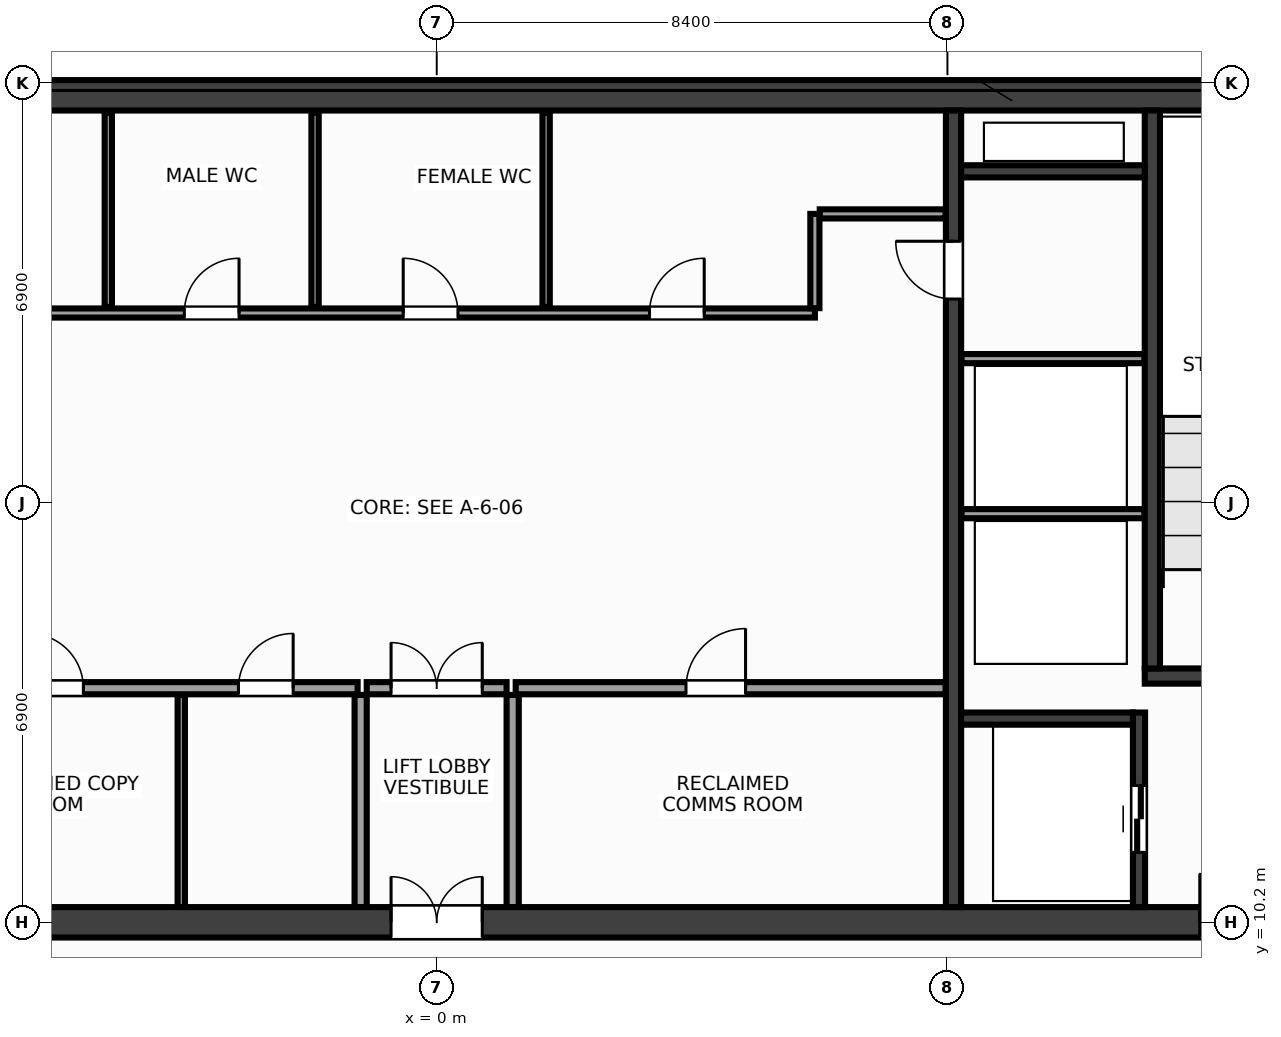
"""IFC4 building model, lengths in metres.
Left out: names, types, materials, properties, quantities, classifications, styles, units other than length and angle.
Written with IfcOpenShell. Run it as: python <this file> out.ifc"""

import sys

from ifc_helpers import new_model, si_unit, direction, frame, frame_2d, origin, place, context, subcontext, project, spatial, rectangle, extrude, source, transform, mapped, element, fill, save


model = new_model("IFC4")
c1 = context("Model", 3, precision=1e-05, world=origin(), true_north=direction((0.0, 1.0)))
c2 = subcontext(c1, "Body", "Model", "MODEL_VIEW")
j1 = project(units=[si_unit("LENGTHUNIT", "METRE"), si_unit("PLANEANGLEUNIT", "RADIAN")], contexts=[c1])
p1 = place(None, origin())
s1 = spatial("IfcSite", under=j1, at=p1, CompositionType="ELEMENT")
p2 = place(p1, origin())
s2 = spatial("IfcBuilding", under=s1, at=p2, CompositionType="ELEMENT")
p3 = place(p2, frame((0.0, 0.0, 214.4)))
s3 = spatial("IfcBuildingStorey", under=s2, at=p3, CompositionType="ELEMENT", Elevation=214.4)
m1 = source(origin(), c2, "Body", "SweptSolid", [
    extrude(rectangle(XDim=31.7, YDim=0.5, at=frame_2d((15.85, 0.0))), origin(), (0.0, 0.0, 1.0), 3.6),
])
p4 = place(p3, frame((-15.85, 23.8, 0.0), z_axis=(0.0, 0.0, 1.0), x_axis=(1.0, 0.0, 0.0)))
e1 = element("IfcWall", 1, at=p4, inside=s3, PredefinedType="SHEAR", context=c2, shape_type="MappedRepresentation", body=[
    mapped(m1, transform((0.0, 0.0, 0.0), x_axis=(1.0, 0.0, 0.0), y_axis=(0.0, 1.0, 0.0), z_axis=(0.0, 0.0, 1.0), scale=1.0)),
])
p5 = place(p3, frame((-15.85, 10.2, 0.0), z_axis=(0.0, 0.0, 1.0), x_axis=(1.0, 0.0, 0.0)))
e2 = element("IfcWall", 2, at=p5, inside=s3, PredefinedType="SHEAR", context=c2, shape_type="MappedRepresentation", body=[
    mapped(m1, transform((0.0, 0.0, 0.0), x_axis=(1.0, 0.0, 0.0), y_axis=(0.0, 1.0, 0.0), z_axis=(0.0, 0.0, 1.0), scale=1.0)),
])
p6 = place(p5, frame((1.7, 0.0, 0.0)))
e3 = element("IfcOpeningElement", 3, at=p6, cuts=e2, PredefinedType="OPENING", context=c2, shape_type="SweptSolid", body=[
    extrude(rectangle(XDim=1.6, YDim=2.15, at=frame_2d((0.8, 1.075))), frame((0.0, 0.262, 0.0), z_axis=(0.0, -1.0, 0.0), x_axis=(1.0, 0.0, 0.0)), (0.0, 0.0, 1.0), 0.524),
])
p7 = place(p5, frame((28.4, 0.0, 0.0)))
e4 = element("IfcOpeningElement", 4, at=p7, cuts=e2, PredefinedType="OPENING", context=c2, shape_type="SweptSolid", body=[
    extrude(rectangle(XDim=1.6, YDim=2.15, at=frame_2d((0.8, 1.075))), frame((0.0, 0.262, 0.0), z_axis=(0.0, -1.0, 0.0), x_axis=(1.0, 0.0, 0.0)), (0.0, 0.0, 1.0), 0.524),
])
p8 = place(p5, frame((15.1, 0.0, 0.0)))
e5 = element("IfcOpeningElement", 5, at=p8, cuts=e2, PredefinedType="OPENING", context=c2, shape_type="SweptSolid", body=[
    extrude(rectangle(XDim=1.5, YDim=2.2, at=frame_2d((0.75, 1.1))), frame((0.0, 0.262, 0.0), z_axis=(0.0, -1.0, 0.0), x_axis=(1.0, 0.0, 0.0)), (0.0, 0.0, 1.0), 0.524),
])
m2 = source(origin(), c2, "Body", "SweptSolid", [
    extrude(rectangle(XDim=13.1, YDim=0.25, at=frame_2d((6.55, 0.0))), origin(), (0.0, 0.0, 1.0), 3.6),
])
p9 = place(p3, frame((8.5, 10.45, 0.0), z_axis=(0.0, 0.0, 1.0), x_axis=(0.0, 1.0, 0.0)))
e6 = element("IfcWall", 6, at=p9, inside=s3, PredefinedType="SHEAR", context=c2, shape_type="MappedRepresentation", body=[
    mapped(m2, transform((0.0, 0.0, 0.0), x_axis=(1.0, 0.0, 0.0), y_axis=(0.0, 1.0, 0.0), z_axis=(0.0, 0.0, 1.0), scale=1.0)),
])
p10 = place(p9, frame((10.0, 0.0, 0.0)))
e7 = element("IfcOpeningElement", 7, at=p10, cuts=e6, PredefinedType="OPENING", context=c2, shape_type="SweptSolid", body=[
    extrude(rectangle(XDim=0.95, YDim=2.15, at=frame_2d((0.475, 1.075))), frame((0.0, 0.137, 0.0), z_axis=(0.0, -1.0, 0.0), x_axis=(1.0, 0.0, 0.0)), (0.0, 0.0, 1.0), 0.274),
])
m3 = source(origin(), c2, "Body", "SweptSolid", [
    extrude(rectangle(XDim=3.705, YDim=0.25, at=frame_2d((1.853, 0.0))), origin(), (0.0, 0.0, 1.0), 3.6),
])
p11 = place(p3, frame((11.645, 14.25, 0.0), z_axis=(0.0, 0.0, 1.0), x_axis=(1.0, 0.0, 0.0)))
e8 = element("IfcWall", 8, at=p11, inside=s3, PredefinedType="SHEAR", context=c2, shape_type="MappedRepresentation", body=[
    mapped(m3, transform((0.0, 0.0, 0.0), x_axis=(1.0, 0.0, 0.0), y_axis=(0.0, 1.0, 0.0), z_axis=(0.0, 0.0, 1.0), scale=1.0)),
])
p12 = place(p11, frame((0.95, 0.0, 0.0)))
e9 = element("IfcOpeningElement", 9, at=p12, cuts=e8, PredefinedType="OPENING", context=c2, shape_type="SweptSolid", body=[
    extrude(rectangle(XDim=1.6, YDim=2.15, at=frame_2d((0.8, 1.075))), frame((0.0, 0.137, 0.0), z_axis=(0.0, -1.0, 0.0), x_axis=(1.0, 0.0, 0.0)), (0.0, 0.0, 1.0), 0.274),
])
m4 = source(origin(), c2, "Body", "SweptSolid", [
    extrude(rectangle(XDim=9.175, YDim=0.25, at=frame_2d((4.587, 0.0))), origin(), (0.0, 0.0, 1.0), 3.6),
])
p13 = place(p3, frame((11.77, 14.375, 0.0), z_axis=(0.0, 0.0, 1.0), x_axis=(0.0, 1.0, 0.0)))
e10 = element("IfcWall", 10, at=p13, inside=s3, PredefinedType="SHEAR", context=c2, shape_type="MappedRepresentation", body=[
    mapped(m4, transform((0.0, 0.0, 0.0), x_axis=(1.0, 0.0, 0.0), y_axis=(0.0, 1.0, 0.0), z_axis=(0.0, 0.0, 1.0), scale=1.0)),
])
m5 = source(origin(), c2, "Body", "SweptSolid", [
    extrude(rectangle(XDim=3.2, YDim=0.2, at=frame_2d((1.6, 0.0))), origin(), (0.0, 0.0, 1.0), 3.6),
])
p14 = place(p3, frame((11.55, 10.45, 0.0), z_axis=(0.0, 0.0, 1.0), x_axis=(0.0, 1.0, 0.0)))
e11 = element("IfcWall", 11, at=p14, inside=s3, PredefinedType="SHEAR", context=c2, shape_type="MappedRepresentation", body=[
    mapped(m5, transform((0.0, 0.0, 0.0), x_axis=(1.0, 0.0, 0.0), y_axis=(0.0, 1.0, 0.0), z_axis=(0.0, 0.0, 1.0), scale=1.0)),
])
p15 = place(p14, frame((0.9, 0.0, 0.0)))
e12 = element("IfcOpeningElement", 12, at=p15, cuts=e11, PredefinedType="OPENING", context=c2, shape_type="SweptSolid", body=[
    extrude(rectangle(XDim=1.1, YDim=2.15, at=frame_2d((0.55, 1.075))), frame((0.0, 0.112, 0.0), z_axis=(0.0, -1.0, 0.0), x_axis=(1.0, 0.0, 0.0)), (0.0, 0.0, 1.0), 0.224),
])
m6 = source(origin(), c2, "Body", "SweptSolid", [
    extrude(rectangle(XDim=2.825, YDim=0.2, at=frame_2d((1.413, 0.0))), origin(), (0.0, 0.0, 1.0), 3.6),
])
p16 = place(p3, frame((8.625, 13.55, 0.0), z_axis=(0.0, 0.0, 1.0), x_axis=(1.0, 0.0, 0.0)))
e13 = element("IfcWall", 13, at=p16, inside=s3, PredefinedType="SHEAR", context=c2, shape_type="MappedRepresentation", body=[
    mapped(m6, transform((0.0, 0.0, 0.0), x_axis=(1.0, 0.0, 0.0), y_axis=(0.0, 1.0, 0.0), z_axis=(0.0, 0.0, 1.0), scale=1.0)),
])
m7 = source(origin(), c2, "Body", "SweptSolid", [
    extrude(rectangle(XDim=3.02, YDim=0.2, at=frame_2d((1.51, 0.0))), origin(), (0.0, 0.0, 1.0), 3.6),
])
p17 = place(p3, frame((8.625, 22.55, 0.0), z_axis=(0.0, 0.0, 1.0), x_axis=(1.0, 0.0, 0.0)))
e14 = element("IfcWall", 14, at=p17, inside=s3, PredefinedType="SHEAR", context=c2, shape_type="MappedRepresentation", body=[
    mapped(m7, transform((0.0, 0.0, 0.0), x_axis=(1.0, 0.0, 0.0), y_axis=(0.0, 1.0, 0.0), z_axis=(0.0, 0.0, 1.0), scale=1.0)),
])
m8 = source(origin(), c2, "Body", "SweptSolid", [
    extrude(rectangle(XDim=3.01, YDim=0.15, at=frame_2d((1.505, 0.0))), origin(), (0.0, 0.0, 1.0), 3.38),
])
for number, where, z_axis, x_axis in (
    (15, (8.63, 16.92, 0.0), (0.0, 0.0, 1.0), (1.0, 0.0, 0.0)),
    (16, (8.63, 19.47, 0.0), (0.0, 0.0, 1.0), (1.0, 0.0, 0.0)),
):
    element("IfcWall", number, at=place(p3, frame(where, z_axis=z_axis, x_axis=x_axis)), inside=s3, PredefinedType="PARTITIONING", context=c2, shape_type="MappedRepresentation", body=[
        mapped(m8, transform((0.0, 0.0, 0.0), x_axis=(1.0, 0.0, 0.0), y_axis=(0.0, 1.0, 0.0), z_axis=(0.0, 0.0, 1.0), scale=1.0)),
    ])
m9 = source(origin(), c2, "Body", "SweptSolid", [
    extrude(rectangle(XDim=7.07, YDim=0.2, at=frame_2d((3.535, 0.0))), origin(), (0.0, 0.0, 1.0), 3.38),
])
p18 = place(p3, frame((-8.37, 14.05, 0.0), z_axis=(0.0, 0.0, 1.0), x_axis=(1.0, 0.0, 0.0)))
e17 = element("IfcWall", 17, at=p18, inside=s3, PredefinedType="PARTITIONING", context=c2, shape_type="MappedRepresentation", body=[
    mapped(m9, transform((0.0, 0.0, 0.0), x_axis=(1.0, 0.0, 0.0), y_axis=(0.0, 1.0, 0.0), z_axis=(0.0, 0.0, 1.0), scale=1.0)),
])
p19 = place(p18, frame((1.66, 0.0, 0.0)))
e18 = element("IfcOpeningElement", 18, at=p19, cuts=e17, PredefinedType="OPENING", context=c2, shape_type="SweptSolid", body=[
    extrude(rectangle(XDim=0.9, YDim=2.15, at=frame_2d((0.45, 1.075))), frame((0.0, 0.112, 0.0), z_axis=(0.0, -1.0, 0.0), x_axis=(1.0, 0.0, 0.0)), (0.0, 0.0, 1.0), 0.224),
])
p20 = place(p18, frame((5.11, 0.0, 0.0)))
e19 = element("IfcOpeningElement", 19, at=p20, cuts=e17, PredefinedType="OPENING", context=c2, shape_type="SweptSolid", body=[
    extrude(rectangle(XDim=0.9, YDim=2.15, at=frame_2d((0.45, 1.075))), frame((0.0, 0.112, 0.0), z_axis=(0.0, -1.0, 0.0), x_axis=(1.0, 0.0, 0.0)), (0.0, 0.0, 1.0), 0.224),
])
p21 = place(p3, frame((1.3, 14.05, 0.0), z_axis=(0.0, 0.0, 1.0), x_axis=(1.0, 0.0, 0.0)))
e20 = element("IfcWall", 20, at=p21, inside=s3, PredefinedType="PARTITIONING", context=c2, shape_type="MappedRepresentation", body=[
    mapped(m9, transform((0.0, 0.0, 0.0), x_axis=(1.0, 0.0, 0.0), y_axis=(0.0, 1.0, 0.0), z_axis=(0.0, 0.0, 1.0), scale=1.0)),
])
p22 = place(p21, frame((2.8, 0.0, 0.0)))
e21 = element("IfcOpeningElement", 21, at=p22, cuts=e20, PredefinedType="OPENING", context=c2, shape_type="SweptSolid", body=[
    extrude(rectangle(XDim=0.98, YDim=2.15, at=frame_2d((0.49, 1.075))), frame((0.0, 0.112, 0.0), z_axis=(0.0, -1.0, 0.0), x_axis=(1.0, 0.0, 0.0)), (0.0, 0.0, 1.0), 0.224),
])
m10 = source(origin(), c2, "Body", "SweptSolid", [
    extrude(rectangle(XDim=3.49, YDim=0.2, at=frame_2d((1.745, 0.0))), origin(), (0.0, 0.0, 1.0), 3.38),
])
for number, where, z_axis, x_axis in (
    (22, (-1.25, 10.45, 0.0), (0.0, 0.0, 1.0), (0.0, 1.0, 0.0)),
    (23, (1.25, 10.45, 0.0), (0.0, 0.0, 1.0), (0.0, 1.0, 0.0)),
):
    element("IfcWall", number, at=place(p3, frame(where, z_axis=z_axis, x_axis=x_axis)), inside=s3, PredefinedType="PARTITIONING", context=c2, shape_type="MappedRepresentation", body=[
        mapped(m10, transform((0.0, 0.0, 0.0), x_axis=(1.0, 0.0, 0.0), y_axis=(0.0, 1.0, 0.0), z_axis=(0.0, 0.0, 1.0), scale=1.0)),
    ])
m11 = source(origin(), c2, "Body", "SweptSolid", [
    extrude(rectangle(XDim=2.3, YDim=0.2, at=frame_2d((1.15, 0.0))), origin(), (0.0, 0.0, 1.0), 3.38),
])
p23 = place(p3, frame((-1.15, 14.05, 0.0), z_axis=(0.0, 0.0, 1.0), x_axis=(1.0, 0.0, 0.0)))
e24 = element("IfcWall", 24, at=p23, inside=s3, PredefinedType="PARTITIONING", context=c2, shape_type="MappedRepresentation", body=[
    mapped(m11, transform((0.0, 0.0, 0.0), x_axis=(1.0, 0.0, 0.0), y_axis=(0.0, 1.0, 0.0), z_axis=(0.0, 0.0, 1.0), scale=1.0)),
])
p24 = place(p23, frame((0.4, 0.0, 0.0)))
e25 = element("IfcOpeningElement", 25, at=p24, cuts=e24, PredefinedType="OPENING", context=c2, shape_type="SweptSolid", body=[
    extrude(rectangle(XDim=1.5, YDim=2.2, at=frame_2d((0.75, 1.1))), frame((0.0, 0.112, 0.0), z_axis=(0.0, -1.0, 0.0), x_axis=(1.0, 0.0, 0.0)), (0.0, 0.0, 1.0), 0.224),
])
m12 = source(origin(), c2, "Body", "SweptSolid", [
    extrude(rectangle(XDim=14.59, YDim=0.15, at=frame_2d((7.295, 0.0))), origin(), (0.0, 0.0, 1.0), 3.38),
])
p25 = place(p3, frame((-8.37, 20.22, 0.0), z_axis=(0.0, 0.0, 1.0), x_axis=(1.0, 0.0, 0.0)))
e26 = element("IfcWall", 26, at=p25, inside=s3, PredefinedType="PARTITIONING", context=c2, shape_type="MappedRepresentation", body=[
    mapped(m12, transform((0.0, 0.0, 0.0), x_axis=(1.0, 0.0, 0.0), y_axis=(0.0, 1.0, 0.0), z_axis=(0.0, 0.0, 1.0), scale=1.0)),
])
p26 = place(p25, frame((1.06, 0.0, 0.0)))
e27 = element("IfcOpeningElement", 27, at=p26, cuts=e26, PredefinedType="OPENING", context=c2, shape_type="SweptSolid", body=[
    extrude(rectangle(XDim=0.9, YDim=2.15, at=frame_2d((0.45, 1.075))), frame((0.0, 0.087, 0.0), z_axis=(0.0, -1.0, 0.0), x_axis=(1.0, 0.0, 0.0)), (0.0, 0.0, 1.0), 0.174),
])
p27 = place(p25, frame((4.22, 0.0, 0.0)))
e28 = element("IfcOpeningElement", 28, at=p27, cuts=e26, PredefinedType="OPENING", context=c2, shape_type="SweptSolid", body=[
    extrude(rectangle(XDim=0.9, YDim=2.15, at=frame_2d((0.45, 1.075))), frame((0.0, 0.087, 0.0), z_axis=(0.0, -1.0, 0.0), x_axis=(1.0, 0.0, 0.0)), (0.0, 0.0, 1.0), 0.174),
])
p28 = place(p25, frame((7.82, 0.0, 0.0)))
e29 = element("IfcOpeningElement", 29, at=p28, cuts=e26, PredefinedType="OPENING", context=c2, shape_type="SweptSolid", body=[
    extrude(rectangle(XDim=0.9, YDim=2.15, at=frame_2d((0.45, 1.075))), frame((0.0, 0.087, 0.0), z_axis=(0.0, -1.0, 0.0), x_axis=(1.0, 0.0, 0.0)), (0.0, 0.0, 1.0), 0.174),
])
p29 = place(p25, frame((11.87, 0.0, 0.0)))
e30 = element("IfcOpeningElement", 30, at=p29, cuts=e26, PredefinedType="OPENING", context=c2, shape_type="SweptSolid", body=[
    extrude(rectangle(XDim=0.9, YDim=2.15, at=frame_2d((0.45, 1.075))), frame((0.0, 0.087, 0.0), z_axis=(0.0, -1.0, 0.0), x_axis=(1.0, 0.0, 0.0)), (0.0, 0.0, 1.0), 0.174),
])
m13 = source(origin(), c2, "Body", "SweptSolid", [
    extrude(rectangle(XDim=1.55, YDim=0.15, at=frame_2d((0.775, 0.0))), origin(), (0.0, 0.0, 1.0), 3.38),
])
p30 = place(p3, frame((6.22, 20.3, 0.0), z_axis=(0.0, 0.0, 1.0), x_axis=(0.0, 1.0, 0.0)))
e31 = element("IfcWall", 31, at=p30, inside=s3, PredefinedType="PARTITIONING", context=c2, shape_type="MappedRepresentation", body=[
    mapped(m13, transform((0.0, 0.0, 0.0), x_axis=(1.0, 0.0, 0.0), y_axis=(0.0, 1.0, 0.0), z_axis=(0.0, 0.0, 1.0), scale=1.0)),
])
m14 = source(origin(), c2, "Body", "SweptSolid", [
    extrude(rectangle(XDim=2.07, YDim=0.15, at=frame_2d((1.035, 0.0))), origin(), (0.0, 0.0, 1.0), 3.38),
])
p31 = place(p3, frame((6.3, 21.85, 0.0), z_axis=(0.0, 0.0, 1.0), x_axis=(1.0, 0.0, 0.0)))
e32 = element("IfcWall", 32, at=p31, inside=s3, PredefinedType="PARTITIONING", context=c2, shape_type="MappedRepresentation", body=[
    mapped(m14, transform((0.0, 0.0, 0.0), x_axis=(1.0, 0.0, 0.0), y_axis=(0.0, 1.0, 0.0), z_axis=(0.0, 0.0, 1.0), scale=1.0)),
])
m15 = source(origin(), c2, "Body", "SweptSolid", [
    extrude(rectangle(XDim=3.49, YDim=0.12, at=frame_2d((1.745, 0.0))), origin(), (0.0, 0.0, 1.0), 3.38),
])
p32 = place(p3, frame((-4.2, 10.45, 0.0), z_axis=(0.0, 0.0, 1.0), x_axis=(0.0, 1.0, 0.0)))
e33 = element("IfcWall", 33, at=p32, inside=s3, PredefinedType="PARTITIONING", context=c2, shape_type="MappedRepresentation", body=[
    mapped(m15, transform((0.0, 0.0, 0.0), x_axis=(1.0, 0.0, 0.0), y_axis=(0.0, 1.0, 0.0), z_axis=(0.0, 0.0, 1.0), scale=1.0)),
])
m16 = source(origin(), c2, "Body", "SweptSolid", [
    extrude(rectangle(XDim=3.19, YDim=0.12, at=frame_2d((1.595, 0.0))), origin(), (0.0, 0.0, 1.0), 3.38),
])
for number, where, z_axis, x_axis in (
    (34, (-5.4, 20.32, 0.0), (0.0, 0.0, 1.0), (0.0, 1.0, 0.0)),
    (35, (-2.0, 20.32, 0.0), (0.0, 0.0, 1.0), (0.0, 1.0, 0.0)),
    (36, (1.8, 20.32, 0.0), (0.0, 0.0, 1.0), (0.0, 1.0, 0.0)),
):
    element("IfcWall", number, at=place(p3, frame(where, z_axis=z_axis, x_axis=x_axis)), inside=s3, PredefinedType="PARTITIONING", context=c2, shape_type="MappedRepresentation", body=[
        mapped(m16, transform((0.0, 0.0, 0.0), x_axis=(1.0, 0.0, 0.0), y_axis=(0.0, 1.0, 0.0), z_axis=(0.0, 0.0, 1.0), scale=1.0)),
    ])
m17 = source(origin(), c2, "Body", "SweptSolid", [
    extrude(rectangle(XDim=1.6, YDim=2.15, at=frame_2d((0.8, 1.075))), frame((0.0, 0.025, 0.0), z_axis=(0.0, -1.0, 0.0), x_axis=(1.0, 0.0, 0.0)), (0.0, 0.0, 1.0), 0.05),
])
p33 = place(p7, origin())
e37 = element("IfcDoor", 37, at=p33, inside=s3, OperationType="DOUBLE_DOOR_SINGLE_SWING", PredefinedType="DOOR", context=c2, shape_type="MappedRepresentation", body=[
    mapped(m17, transform((0.0, 0.0, 0.0), x_axis=(1.0, 0.0, 0.0), y_axis=(0.0, 1.0, 0.0), z_axis=(0.0, 0.0, 1.0), scale=1.0)),
])
fill(e4, e37)
m18 = source(origin(), c2, "Body", "SweptSolid", [
    extrude(rectangle(XDim=1.1, YDim=2.15, at=frame_2d((0.55, 1.075))), frame((0.0, 0.025, 0.0), z_axis=(0.0, -1.0, 0.0), x_axis=(1.0, 0.0, 0.0)), (0.0, 0.0, 1.0), 0.05),
])
p34 = place(p15, origin())
e38 = element("IfcDoor", 38, at=p34, inside=s3, OperationType="DOUBLE_DOOR_SLIDING", PredefinedType="DOOR", context=c2, shape_type="MappedRepresentation", body=[
    mapped(m18, transform((0.0, 0.0, 0.0), x_axis=(1.0, 0.0, 0.0), y_axis=(0.0, 1.0, 0.0), z_axis=(0.0, 0.0, 1.0), scale=1.0)),
])
fill(e12, e38)
m19 = source(origin(), c2, "Body", "SweptSolid", [
    extrude(rectangle(XDim=0.95, YDim=2.15, at=frame_2d((0.475, 1.075))), frame((0.0, 0.025, 0.0), z_axis=(0.0, -1.0, 0.0), x_axis=(1.0, 0.0, 0.0)), (0.0, 0.0, 1.0), 0.05),
])
p35 = place(p10, origin())
e39 = element("IfcDoor", 39, at=p35, inside=s3, OperationType="SINGLE_SWING_RIGHT", PredefinedType="DOOR", context=c2, shape_type="MappedRepresentation", body=[
    mapped(m19, transform((0.0, 0.0, 0.0), x_axis=(1.0, 0.0, 0.0), y_axis=(0.0, 1.0, 0.0), z_axis=(0.0, 0.0, 1.0), scale=1.0)),
])
fill(e7, e39)
m20 = source(origin(), c2, "Body", "SweptSolid", [
    extrude(rectangle(XDim=0.9, YDim=2.15, at=frame_2d((0.45, 1.075))), frame((0.0, 0.025, 0.0), z_axis=(0.0, -1.0, 0.0), x_axis=(1.0, 0.0, 0.0)), (0.0, 0.0, 1.0), 0.05),
])
p36 = place(p19, origin())
e40 = element("IfcDoor", 40, at=p36, inside=s3, OperationType="SINGLE_SWING_LEFT", PredefinedType="DOOR", context=c2, shape_type="MappedRepresentation", body=[
    mapped(m20, transform((0.0, 0.0, 0.0), x_axis=(1.0, 0.0, 0.0), y_axis=(0.0, 1.0, 0.0), z_axis=(0.0, 0.0, 1.0), scale=1.0)),
])
fill(e18, e40)
p37 = place(p20, origin())
e41 = element("IfcDoor", 41, at=p37, inside=s3, OperationType="SINGLE_SWING_RIGHT", PredefinedType="DOOR", context=c2, shape_type="MappedRepresentation", body=[
    mapped(m20, transform((0.0, 0.0, 0.0), x_axis=(1.0, 0.0, 0.0), y_axis=(0.0, 1.0, 0.0), z_axis=(0.0, 0.0, 1.0), scale=1.0)),
])
fill(e19, e41)
m21 = source(origin(), c2, "Body", "SweptSolid", [
    extrude(rectangle(XDim=0.98, YDim=2.15, at=frame_2d((0.49, 1.075))), frame((0.0, 0.025, 0.0), z_axis=(0.0, -1.0, 0.0), x_axis=(1.0, 0.0, 0.0)), (0.0, 0.0, 1.0), 0.05),
])
p38 = place(p22, origin())
e42 = element("IfcDoor", 42, at=p38, inside=s3, OperationType="SINGLE_SWING_RIGHT", PredefinedType="DOOR", context=c2, shape_type="MappedRepresentation", body=[
    mapped(m21, transform((0.0, 0.0, 0.0), x_axis=(1.0, 0.0, 0.0), y_axis=(0.0, 1.0, 0.0), z_axis=(0.0, 0.0, 1.0), scale=1.0)),
])
fill(e21, e42)
m22 = source(origin(), c2, "Body", "SweptSolid", [
    extrude(rectangle(XDim=1.5, YDim=2.2, at=frame_2d((0.75, 1.1))), frame((0.0, 0.025, 0.0), z_axis=(0.0, -1.0, 0.0), x_axis=(1.0, 0.0, 0.0)), (0.0, 0.0, 1.0), 0.05),
])
p39 = place(p24, origin())
e43 = element("IfcDoor", 43, at=p39, inside=s3, OperationType="DOUBLE_DOOR_SINGLE_SWING", PredefinedType="DOOR", context=c2, shape_type="MappedRepresentation", body=[
    mapped(m22, transform((0.0, 0.0, 0.0), x_axis=(1.0, 0.0, 0.0), y_axis=(0.0, 1.0, 0.0), z_axis=(0.0, 0.0, 1.0), scale=1.0)),
])
fill(e25, e43)
p40 = place(p8, origin())
e44 = element("IfcDoor", 44, at=p40, inside=s3, OperationType="DOUBLE_DOOR_SINGLE_SWING", PredefinedType="DOOR", context=c2, shape_type="MappedRepresentation", body=[
    mapped(m22, transform((0.0, 0.0, 0.0), x_axis=(1.0, 0.0, 0.0), y_axis=(0.0, 1.0, 0.0), z_axis=(0.0, 0.0, 1.0), scale=1.0)),
])
fill(e5, e44)
p41 = place(p27, origin())
e45 = element("IfcDoor", 45, at=p41, inside=s3, OperationType="SINGLE_SWING_RIGHT", PredefinedType="DOOR", context=c2, shape_type="MappedRepresentation", body=[
    mapped(m20, transform((0.0, 0.0, 0.0), x_axis=(1.0, 0.0, 0.0), y_axis=(0.0, 1.0, 0.0), z_axis=(0.0, 0.0, 1.0), scale=1.0)),
])
fill(e28, e45)
p42 = place(p28, origin())
e46 = element("IfcDoor", 46, at=p42, inside=s3, OperationType="SINGLE_SWING_LEFT", PredefinedType="DOOR", context=c2, shape_type="MappedRepresentation", body=[
    mapped(m20, transform((0.0, 0.0, 0.0), x_axis=(1.0, 0.0, 0.0), y_axis=(0.0, 1.0, 0.0), z_axis=(0.0, 0.0, 1.0), scale=1.0)),
])
fill(e29, e46)
p43 = place(p29, origin())
e47 = element("IfcDoor", 47, at=p43, inside=s3, OperationType="SINGLE_SWING_RIGHT", PredefinedType="DOOR", context=c2, shape_type="MappedRepresentation", body=[
    mapped(m20, transform((0.0, 0.0, 0.0), x_axis=(1.0, 0.0, 0.0), y_axis=(0.0, 1.0, 0.0), z_axis=(0.0, 0.0, 1.0), scale=1.0)),
])
fill(e30, e47)
save(model, sys.argv[1])
